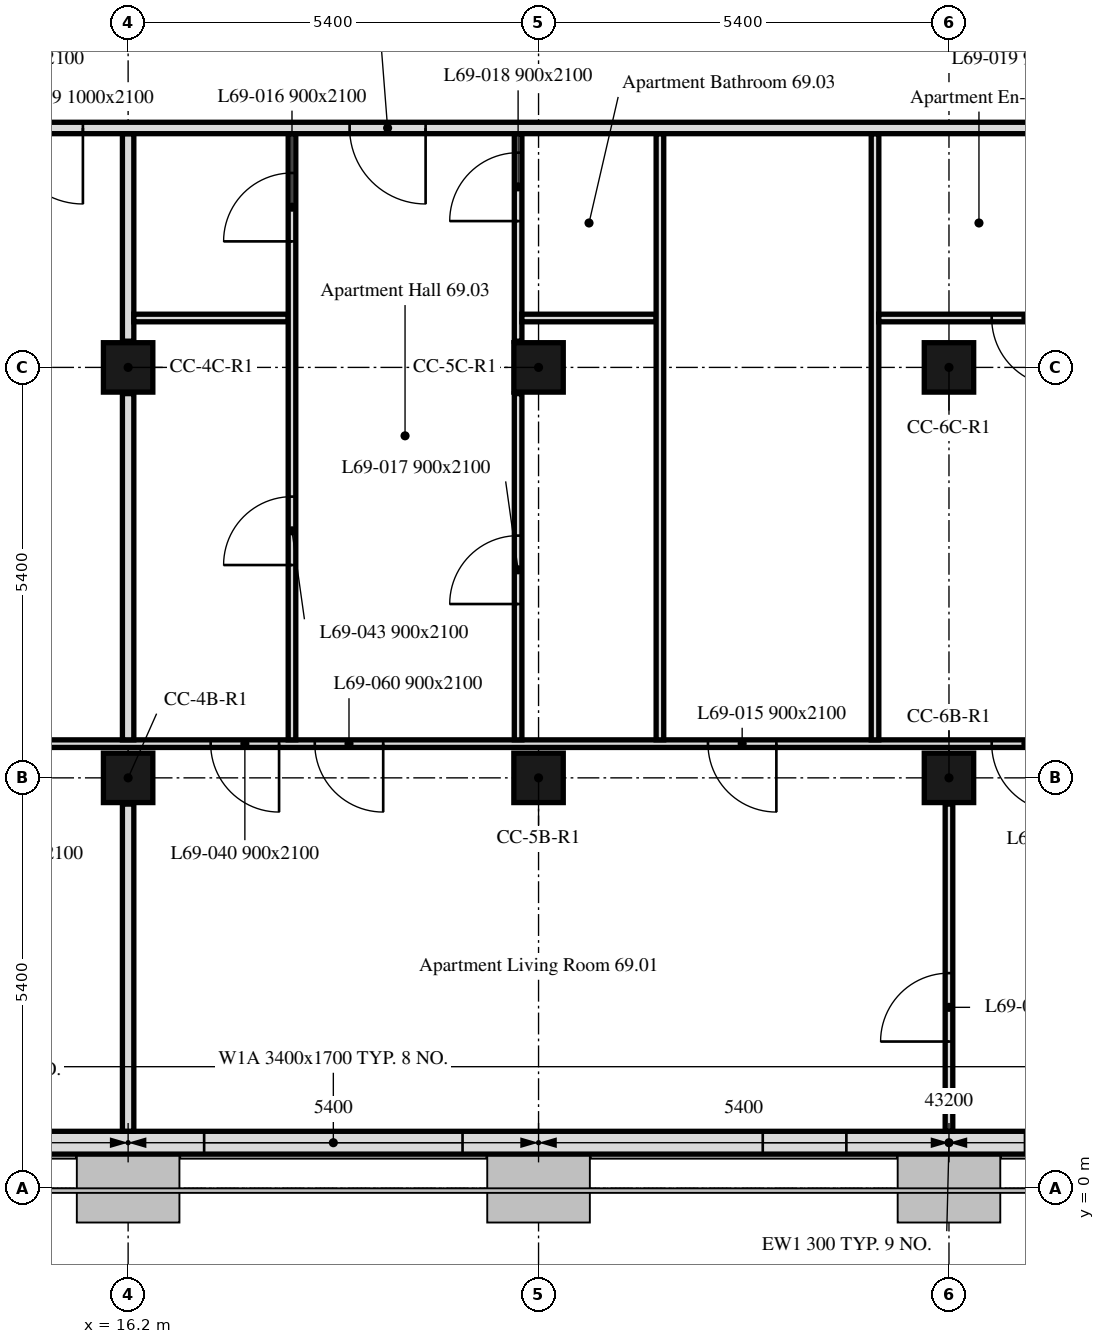
"""IFC4 building model, lengths in metres.
Left out: names, types, materials, properties, quantities, classifications, styles, units other than length and angle.
Written with IfcOpenShell. Run it as: python <this file> out.ifc"""

import sys

from ifc_helpers import new_model, si_unit, direction, frame, frame_2d, origin, origin_2d, place, context, subcontext, project, spatial, rectangle, extrude, element, fill, save


model = new_model("IFC4")
c1 = context("Model", 3, precision=1e-05, world=origin(), true_north=direction((0.0, 1.0)))
c2 = subcontext(c1, "Body", "Model", "MODEL_VIEW")
j1 = project(units=[si_unit("LENGTHUNIT", "METRE"), si_unit("PLANEANGLEUNIT", "RADIAN")], contexts=[c1])
p1 = place(None, origin())
s1 = spatial("IfcSite", under=j1, at=p1, CompositionType="ELEMENT")
p2 = place(p1, origin())
s2 = spatial("IfcBuilding", under=s1, at=p2, CompositionType="ELEMENT")
p3 = place(p2, frame((0.0, 0.0, 281.8)))
s3 = spatial("IfcBuildingStorey", under=s2, at=p3, CompositionType="ELEMENT", Elevation=281.8)
for number, where, z_axis, x_axis in (
    (1, (16.2, 5.4, 0.0), (0.0, 0.0, 1.0), (1.0, 0.0, 0.0)),
    (2, (21.6, 5.4, 0.0), (0.0, 0.0, 1.0), (1.0, 0.0, 0.0)),
    (3, (27.0, 5.4, 0.0), (0.0, 0.0, 1.0), (1.0, 0.0, 0.0)),
    (4, (16.2, 10.8, 0.0), (0.0, 0.0, 1.0), (1.0, 0.0, 0.0)),
    (5, (21.6, 10.8, 0.0), (0.0, 0.0, 1.0), (1.0, 0.0, 0.0)),
    (6, (27.0, 10.8, 0.0), (0.0, 0.0, 1.0), (1.0, 0.0, 0.0)),
):
    element("IfcColumn", number, at=place(p3, frame(where, z_axis=z_axis, x_axis=x_axis)), inside=s3, PredefinedType="COLUMN", context=c2, shape_type="SweptSolid", body=[
        extrude(rectangle(XDim=0.65, YDim=0.65, at=origin_2d()), origin(), (0.0, 0.0, 1.0), 3.0),
    ])
p4 = place(p3, frame((10.986, 0.6, 0.0), z_axis=(0.0, 0.0, 1.0), x_axis=(1.0, 0.0, 0.0)))
e7 = element("IfcWall", 7, at=p4, inside=s3, PredefinedType="SOLIDWALL", context=c2, shape_type="SweptSolid", body=[
    extrude(rectangle(XDim=32.027, YDim=0.3, at=frame_2d((16.014, 0.0))), origin(), (0.0, 0.0, 1.0), 3.0),
])
p5 = place(p4, frame((2.764, 0.0, 0.9)))
e8 = element("IfcOpeningElement", 8, at=p5, cuts=e7, PredefinedType="OPENING", context=c2, shape_type="SweptSolid", body=[
    extrude(rectangle(XDim=1.1, YDim=1.7, at=frame_2d((0.55, 0.85))), frame((0.0, 0.16, 0.0), z_axis=(0.0, -1.0, 0.0), x_axis=(1.0, 0.0, 0.0)), (0.0, 0.0, 1.0), 0.32),
])
p6 = place(p4, frame((6.214, 0.0, 0.9)))
e9 = element("IfcOpeningElement", 9, at=p6, cuts=e7, PredefinedType="OPENING", context=c2, shape_type="SweptSolid", body=[
    extrude(rectangle(XDim=3.4, YDim=1.7, at=frame_2d((1.7, 0.85))), frame((0.0, 0.16, 0.0), z_axis=(0.0, -1.0, 0.0), x_axis=(1.0, 0.0, 0.0)), (0.0, 0.0, 1.0), 0.32),
])
p7 = place(p4, frame((13.564, 0.0, 0.9)))
e10 = element("IfcOpeningElement", 10, at=p7, cuts=e7, PredefinedType="OPENING", context=c2, shape_type="SweptSolid", body=[
    extrude(rectangle(XDim=1.1, YDim=1.7, at=frame_2d((0.55, 0.85))), frame((0.0, 0.16, 0.0), z_axis=(0.0, -1.0, 0.0), x_axis=(1.0, 0.0, 0.0)), (0.0, 0.0, 1.0), 0.32),
])
p8 = place(p4, frame((17.014, 0.0, 0.9)))
e11 = element("IfcOpeningElement", 11, at=p8, cuts=e7, PredefinedType="OPENING", context=c2, shape_type="SweptSolid", body=[
    extrude(rectangle(XDim=3.4, YDim=1.7, at=frame_2d((1.7, 0.85))), frame((0.0, 0.16, 0.0), z_axis=(0.0, -1.0, 0.0), x_axis=(1.0, 0.0, 0.0)), (0.0, 0.0, 1.0), 0.32),
])
p9 = place(p4, frame((24.364, 0.0, 0.9)))
e12 = element("IfcOpeningElement", 12, at=p9, cuts=e7, PredefinedType="OPENING", context=c2, shape_type="SweptSolid", body=[
    extrude(rectangle(XDim=1.1, YDim=1.7, at=frame_2d((0.55, 0.85))), frame((0.0, 0.16, 0.0), z_axis=(0.0, -1.0, 0.0), x_axis=(1.0, 0.0, 0.0)), (0.0, 0.0, 1.0), 0.32),
])
p10 = place(p4, frame((27.814, 0.0, 0.9)))
e13 = element("IfcOpeningElement", 13, at=p10, cuts=e7, PredefinedType="OPENING", context=c2, shape_type="SweptSolid", body=[
    extrude(rectangle(XDim=3.4, YDim=1.7, at=frame_2d((1.7, 0.85))), frame((0.0, 0.16, 0.0), z_axis=(0.0, -1.0, 0.0), x_axis=(1.0, 0.0, 0.0)), (0.0, 0.0, 1.0), 0.32),
])
p11 = place(p3, frame((37.652, 5.85, 0.0), z_axis=(0.0, 0.0, 1.0), x_axis=(-1.0, 0.0, 0.0)))
e14 = element("IfcWall", 14, at=p11, inside=s3, PredefinedType="PARTITIONING", context=c2, shape_type="SweptSolid", body=[
    extrude(rectangle(XDim=31.501, YDim=0.1, at=frame_2d((15.75, 0.0))), origin(), (0.0, 0.0, 1.0), 2.4),
])
p12 = place(p11, frame((12.923, 0.0, 0.0)))
e15 = element("IfcOpeningElement", 15, at=p12, cuts=e14, PredefinedType="OPENING", context=c2, shape_type="SweptSolid", body=[
    extrude(rectangle(XDim=0.9, YDim=2.1, at=frame_2d((0.45, 1.05))), frame((0.0, 0.05, 0.0), z_axis=(0.0, -1.0, 0.0), x_axis=(1.0, 0.0, 0.0)), (0.0, 0.0, 1.0), 0.1),
])
p13 = place(p11, frame((29.422, 0.0, 0.0)))
e16 = element("IfcOpeningElement", 16, at=p13, cuts=e14, PredefinedType="OPENING", context=c2, shape_type="SweptSolid", body=[
    extrude(rectangle(XDim=0.9, YDim=2.1, at=frame_2d((0.45, 1.05))), frame((0.0, 0.05, 0.0), z_axis=(0.0, -1.0, 0.0), x_axis=(1.0, 0.0, 0.0)), (0.0, 0.0, 1.0), 0.1),
])
p14 = place(p11, frame((28.182, 0.0, 0.0)))
e17 = element("IfcOpeningElement", 17, at=p14, cuts=e14, PredefinedType="OPENING", context=c2, shape_type="SweptSolid", body=[
    extrude(rectangle(XDim=0.9, YDim=2.1, at=frame_2d((0.45, 1.05))), frame((0.0, 0.05, 0.0), z_axis=(0.0, -1.0, 0.0), x_axis=(1.0, 0.0, 0.0)), (0.0, 0.0, 1.0), 0.1),
])
p15 = place(p11, frame((23.942, 0.0, 0.0)))
e18 = element("IfcOpeningElement", 18, at=p15, cuts=e14, PredefinedType="OPENING", context=c2, shape_type="SweptSolid", body=[
    extrude(rectangle(XDim=0.9, YDim=2.1, at=frame_2d((0.45, 1.05))), frame((0.0, 0.05, 0.0), z_axis=(0.0, -1.0, 0.0), x_axis=(1.0, 0.0, 0.0)), (0.0, 0.0, 1.0), 0.1),
])
p16 = place(p11, frame((22.572, 0.0, 0.0)))
e19 = element("IfcOpeningElement", 19, at=p16, cuts=e14, PredefinedType="OPENING", context=c2, shape_type="SweptSolid", body=[
    extrude(rectangle(XDim=0.9, YDim=2.1, at=frame_2d((0.45, 1.05))), frame((0.0, 0.05, 0.0), z_axis=(0.0, -1.0, 0.0), x_axis=(1.0, 0.0, 0.0)), (0.0, 0.0, 1.0), 0.1),
])
p17 = place(p11, frame((19.466, 0.0, 0.0)))
e20 = element("IfcOpeningElement", 20, at=p17, cuts=e14, PredefinedType="OPENING", context=c2, shape_type="SweptSolid", body=[
    extrude(rectangle(XDim=0.9, YDim=2.1, at=frame_2d((0.45, 1.05))), frame((0.0, 0.05, 0.0), z_axis=(0.0, -1.0, 0.0), x_axis=(1.0, 0.0, 0.0)), (0.0, 0.0, 1.0), 0.1),
])
p18 = place(p11, frame((9.19, 0.0, 0.0)))
e21 = element("IfcOpeningElement", 21, at=p18, cuts=e14, PredefinedType="OPENING", context=c2, shape_type="SweptSolid", body=[
    extrude(rectangle(XDim=0.9, YDim=2.1, at=frame_2d((0.45, 1.05))), frame((0.0, 0.05, 0.0), z_axis=(0.0, -1.0, 0.0), x_axis=(1.0, 0.0, 0.0)), (0.0, 0.0, 1.0), 0.1),
])
p19 = place(p11, frame((7.512, 0.0, 0.0)))
e22 = element("IfcOpeningElement", 22, at=p19, cuts=e14, PredefinedType="OPENING", context=c2, shape_type="SweptSolid", body=[
    extrude(rectangle(XDim=0.9, YDim=2.1, at=frame_2d((0.45, 1.05))), frame((0.0, 0.05, 0.0), z_axis=(0.0, -1.0, 0.0), x_axis=(1.0, 0.0, 0.0)), (0.0, 0.0, 1.0), 0.1),
])
p20 = place(p11, frame((2.952, 0.0, 0.0)))
e23 = element("IfcOpeningElement", 23, at=p20, cuts=e14, PredefinedType="OPENING", context=c2, shape_type="SweptSolid", body=[
    extrude(rectangle(XDim=0.9, YDim=2.1, at=frame_2d((0.45, 1.05))), frame((0.0, 0.05, 0.0), z_axis=(0.0, -1.0, 0.0), x_axis=(1.0, 0.0, 0.0)), (0.0, 0.0, 1.0), 0.1),
])
p21 = place(p11, frame((18.096, 0.0, 0.0)))
e24 = element("IfcOpeningElement", 24, at=p21, cuts=e14, PredefinedType="OPENING", context=c2, shape_type="SweptSolid", body=[
    extrude(rectangle(XDim=0.9, YDim=2.1, at=frame_2d((0.45, 1.05))), frame((0.0, 0.05, 0.0), z_axis=(0.0, -1.0, 0.0), x_axis=(1.0, 0.0, 0.0)), (0.0, 0.0, 1.0), 0.1),
])
p22 = place(p3, frame((16.2, 0.751, 0.0), z_axis=(0.0, 0.0, 1.0), x_axis=(0.0, 1.0, 0.0)))
e25 = element("IfcWall", 25, at=p22, inside=s3, PredefinedType="PARTITIONING", context=c2, shape_type="SweptSolid", body=[
    extrude(rectangle(XDim=4.304, YDim=0.15, at=frame_2d((2.152, 0.0))), origin(), (0.0, 0.0, 1.0), 2.4),
])
p23 = place(p3, frame((16.2, 5.9, 0.0), z_axis=(0.0, 0.0, 1.0), x_axis=(0.0, 1.0, 0.0)))
e26 = element("IfcWall", 26, at=p23, inside=s3, PredefinedType="PARTITIONING", context=c2, shape_type="SweptSolid", body=[
    extrude(rectangle(XDim=4.555, YDim=0.15, at=frame_2d((2.278, 0.0))), origin(), (0.0, 0.0, 1.0), 2.4),
])
p24 = place(p3, frame((16.2, 11.145, 0.0), z_axis=(0.0, 0.0, 1.0), x_axis=(0.0, 1.0, 0.0)))
e27 = element("IfcWall", 27, at=p24, inside=s3, PredefinedType="PARTITIONING", context=c2, shape_type="SweptSolid", body=[
    extrude(rectangle(XDim=2.73, YDim=0.15, at=frame_2d((1.365, 0.0))), origin(), (0.0, 0.0, 1.0), 2.4),
])
p25 = place(p3, frame((27.0, 0.751, 0.0), z_axis=(0.0, 0.0, 1.0), x_axis=(0.0, 1.0, 0.0)))
e28 = element("IfcWall", 28, at=p25, inside=s3, PredefinedType="PARTITIONING", context=c2, shape_type="SweptSolid", body=[
    extrude(rectangle(XDim=4.304, YDim=0.1, at=frame_2d((2.152, 0.0))), origin(), (0.0, 0.0, 1.0), 2.4),
])
p26 = place(p25, frame((1.18, 0.0, 0.0)))
e29 = element("IfcOpeningElement", 29, at=p26, cuts=e28, PredefinedType="OPENING", context=c2, shape_type="SweptSolid", body=[
    extrude(rectangle(XDim=0.9, YDim=2.1, at=frame_2d((0.45, 1.05))), frame((0.0, 0.05, 0.0), z_axis=(0.0, -1.0, 0.0), x_axis=(1.0, 0.0, 0.0)), (0.0, 0.0, 1.0), 0.1),
])
p27 = place(p3, frame((18.306, 11.45, 0.0), z_axis=(0.0, 0.0, 1.0), x_axis=(-1.0, 0.0, 0.0)))
e30 = element("IfcWall", 30, at=p27, inside=s3, PredefinedType="PARTITIONING", context=c2, shape_type="SweptSolid", body=[
    extrude(rectangle(XDim=2.031, YDim=0.1, at=frame_2d((1.016, 0.0))), origin(), (0.0, 0.0, 1.0), 3.0),
])
p28 = place(p3, frame((18.356, 5.9, 0.0), z_axis=(0.0, 0.0, 1.0), x_axis=(0.0, 1.0, 0.0)))
e31 = element("IfcWall", 31, at=p28, inside=s3, PredefinedType="PARTITIONING", context=c2, shape_type="SweptSolid", body=[
    extrude(rectangle(XDim=7.975, YDim=0.1, at=frame_2d((3.988, 0.0))), origin(), (0.0, 0.0, 1.0), 3.0),
])
p29 = place(p28, frame((6.558, 0.0, 0.0)))
e32 = element("IfcOpeningElement", 32, at=p29, cuts=e31, PredefinedType="OPENING", context=c2, shape_type="SweptSolid", body=[
    extrude(rectangle(XDim=0.9, YDim=2.1, at=frame_2d((0.45, 1.05))), frame((0.0, 0.05, 0.0), z_axis=(0.0, -1.0, 0.0), x_axis=(1.0, 0.0, 0.0)), (0.0, 0.0, 1.0), 0.1),
])
p30 = place(p28, frame((2.3, 0.0, 0.0)))
e33 = element("IfcOpeningElement", 33, at=p30, cuts=e31, PredefinedType="OPENING", context=c2, shape_type="SweptSolid", body=[
    extrude(rectangle(XDim=0.9, YDim=2.1, at=frame_2d((0.45, 1.05))), frame((0.0, 0.05, 0.0), z_axis=(0.0, -1.0, 0.0), x_axis=(1.0, 0.0, 0.0)), (0.0, 0.0, 1.0), 0.1),
])
p31 = place(p3, frame((21.331, 5.9, 0.0), z_axis=(0.0, 0.0, 1.0), x_axis=(0.0, 1.0, 0.0)))
e34 = element("IfcWall", 34, at=p31, inside=s3, PredefinedType="PARTITIONING", context=c2, shape_type="SweptSolid", body=[
    extrude(rectangle(XDim=4.555, YDim=0.1, at=frame_2d((2.278, 0.0))), origin(), (0.0, 0.0, 1.0), 3.0),
])
p32 = place(p31, frame((1.787, 0.0, 0.0)))
e35 = element("IfcOpeningElement", 35, at=p32, cuts=e34, PredefinedType="OPENING", context=c2, shape_type="SweptSolid", body=[
    extrude(rectangle(XDim=0.9, YDim=2.1, at=frame_2d((0.45, 1.05))), frame((0.0, 0.05, 0.0), z_axis=(0.0, -1.0, 0.0), x_axis=(1.0, 0.0, 0.0)), (0.0, 0.0, 1.0), 0.1),
])
p33 = place(p3, frame((21.331, 11.145, 0.0), z_axis=(0.0, 0.0, 1.0), x_axis=(0.0, 1.0, 0.0)))
e36 = element("IfcWall", 36, at=p33, inside=s3, PredefinedType="PARTITIONING", context=c2, shape_type="SweptSolid", body=[
    extrude(rectangle(XDim=2.73, YDim=0.1, at=frame_2d((1.365, 0.0))), origin(), (0.0, 0.0, 1.0), 3.0),
])
p34 = place(p33, frame((1.58, 0.0, 0.0)))
e37 = element("IfcOpeningElement", 37, at=p34, cuts=e36, PredefinedType="OPENING", context=c2, shape_type="SweptSolid", body=[
    extrude(rectangle(XDim=0.9, YDim=2.1, at=frame_2d((0.45, 1.05))), frame((0.0, 0.05, 0.0), z_axis=(0.0, -1.0, 0.0), x_axis=(1.0, 0.0, 0.0)), (0.0, 0.0, 1.0), 0.1),
])
p35 = place(p3, frame((23.147, 11.45, 0.0), z_axis=(0.0, 0.0, 1.0), x_axis=(-1.0, 0.0, 0.0)))
e38 = element("IfcWall", 38, at=p35, inside=s3, PredefinedType="PARTITIONING", context=c2, shape_type="SweptSolid", body=[
    extrude(rectangle(XDim=1.766, YDim=0.1, at=frame_2d((0.883, 0.0))), origin(), (0.0, 0.0, 1.0), 2.4),
])
for number, where, z_axis, x_axis in (
    (39, (23.197, 5.9, 0.0), (0.0, 0.0, 1.0), (0.0, 1.0, 0.0)),
    (40, (26.027, 5.9, 0.0), (0.0, 0.0, 1.0), (0.0, 1.0, 0.0)),
):
    element("IfcWall", number, at=place(p3, frame(where, z_axis=z_axis, x_axis=x_axis)), inside=s3, PredefinedType="PARTITIONING", context=c2, shape_type="SweptSolid", body=[
        extrude(rectangle(XDim=7.975, YDim=0.1, at=frame_2d((3.988, 0.0))), origin(), (0.0, 0.0, 1.0), 3.0),
    ])
p36 = place(p3, frame((28.712, 11.45, 0.0), z_axis=(0.0, 0.0, 1.0), x_axis=(-1.0, 0.0, 0.0)))
e41 = element("IfcWall", 41, at=p36, inside=s3, PredefinedType="PARTITIONING", context=c2, shape_type="SweptSolid", body=[
    extrude(rectangle(XDim=2.635, YDim=0.1, at=frame_2d((1.317, 0.0))), origin(), (0.0, 0.0, 1.0), 2.4),
])
p37 = place(p36, frame((0.25, 0.0, 0.0)))
e42 = element("IfcOpeningElement", 42, at=p37, cuts=e41, PredefinedType="OPENING", context=c2, shape_type="SweptSolid", body=[
    extrude(rectangle(XDim=0.9, YDim=2.1, at=frame_2d((0.45, 1.05))), frame((0.0, 0.05, 0.0), z_axis=(0.0, -1.0, 0.0), x_axis=(1.0, 0.0, 0.0)), (0.0, 0.0, 1.0), 0.1),
])
p38 = place(p3, frame((47.849, 13.95, 0.0), z_axis=(0.0, 0.0, 1.0), x_axis=(-1.0, 0.0, 0.0)))
e43 = element("IfcWall", 43, at=p38, inside=s3, PredefinedType="PARTITIONING", context=c2, shape_type="SweptSolid", body=[
    extrude(rectangle(XDim=41.698, YDim=0.15, at=frame_2d((20.849, 0.0))), origin(), (0.0, 0.0, 1.0), 2.4),
])
p39 = place(p38, frame((37.749, 0.0, 0.0)))
e44 = element("IfcOpeningElement", 44, at=p39, cuts=e43, PredefinedType="OPENING", context=c2, shape_type="SweptSolid", body=[
    extrude(rectangle(XDim=1.0, YDim=2.1, at=frame_2d((0.5, 1.05))), frame((0.0, 0.075, 0.0), z_axis=(0.0, -1.0, 0.0), x_axis=(1.0, 0.0, 0.0)), (0.0, 0.0, 1.0), 0.15),
])
p40 = place(p38, frame((32.244, 0.0, 0.0)))
e45 = element("IfcOpeningElement", 45, at=p40, cuts=e43, PredefinedType="OPENING", context=c2, shape_type="SweptSolid", body=[
    extrude(rectangle(XDim=1.0, YDim=2.1, at=frame_2d((0.5, 1.05))), frame((0.0, 0.075, 0.0), z_axis=(0.0, -1.0, 0.0), x_axis=(1.0, 0.0, 0.0)), (0.0, 0.0, 1.0), 0.15),
])
p41 = place(p38, frame((27.735, 0.0, 0.0)))
e46 = element("IfcOpeningElement", 46, at=p41, cuts=e43, PredefinedType="OPENING", context=c2, shape_type="SweptSolid", body=[
    extrude(rectangle(XDim=1.0, YDim=2.1, at=frame_2d((0.5, 1.05))), frame((0.0, 0.075, 0.0), z_axis=(0.0, -1.0, 0.0), x_axis=(1.0, 0.0, 0.0)), (0.0, 0.0, 1.0), 0.15),
])
p42 = place(p38, frame((8.347, 0.0, 0.0)))
e47 = element("IfcOpeningElement", 47, at=p42, cuts=e43, PredefinedType="OPENING", context=c2, shape_type="SweptSolid", body=[
    extrude(rectangle(XDim=1.0, YDim=2.1, at=frame_2d((0.5, 1.05))), frame((0.0, 0.075, 0.0), z_axis=(0.0, -1.0, 0.0), x_axis=(1.0, 0.0, 0.0)), (0.0, 0.0, 1.0), 0.15),
])
p43 = place(p6, origin())
e48 = element("IfcWindow", 48, at=p43, inside=s3, PartitioningType="SINGLE_PANEL", PredefinedType="WINDOW", context=c2, shape_type="SweptSolid", body=[
    extrude(rectangle(XDim=3.4, YDim=1.7, at=frame_2d((1.7, 0.85))), frame((0.0, 0.03, 0.0), z_axis=(0.0, -1.0, 0.0), x_axis=(1.0, 0.0, 0.0)), (0.0, 0.0, 1.0), 0.06),
])
fill(e9, e48)
p44 = place(p7, origin())
e49 = element("IfcWindow", 49, at=p44, inside=s3, PartitioningType="SINGLE_PANEL", PredefinedType="WINDOW", context=c2, shape_type="SweptSolid", body=[
    extrude(rectangle(XDim=1.1, YDim=1.7, at=frame_2d((0.55, 0.85))), frame((0.0, 0.03, 0.0), z_axis=(0.0, -1.0, 0.0), x_axis=(1.0, 0.0, 0.0)), (0.0, 0.0, 1.0), 0.06),
])
fill(e10, e49)
p45 = place(p12, origin())
e50 = element("IfcDoor", 50, at=p45, inside=s3, OperationType="SINGLE_SWING_RIGHT", PredefinedType="DOOR", context=c2, shape_type="SweptSolid", body=[
    extrude(rectangle(XDim=0.9, YDim=2.1, at=frame_2d((0.45, 1.05))), frame((0.0, 0.025, 0.0), z_axis=(0.0, -1.0, 0.0), x_axis=(1.0, 0.0, 0.0)), (0.0, 0.0, 1.0), 0.05),
])
fill(e15, e50)
p46 = place(p29, origin())
e51 = element("IfcDoor", 51, at=p46, inside=s3, OperationType="SINGLE_SWING_RIGHT", PredefinedType="DOOR", context=c2, shape_type="SweptSolid", body=[
    extrude(rectangle(XDim=0.9, YDim=2.1, at=frame_2d((0.45, 1.05))), frame((0.0, 0.025, 0.0), z_axis=(0.0, -1.0, 0.0), x_axis=(1.0, 0.0, 0.0)), (0.0, 0.0, 1.0), 0.05),
])
fill(e32, e51)
p47 = place(p32, origin())
e52 = element("IfcDoor", 52, at=p47, inside=s3, OperationType="SINGLE_SWING_LEFT", PredefinedType="DOOR", context=c2, shape_type="SweptSolid", body=[
    extrude(rectangle(XDim=0.9, YDim=2.1, at=frame_2d((0.45, 1.05))), frame((0.0, 0.025, 0.0), z_axis=(0.0, -1.0, 0.0), x_axis=(1.0, 0.0, 0.0)), (0.0, 0.0, 1.0), 0.05),
])
fill(e35, e52)
p48 = place(p34, origin())
e53 = element("IfcDoor", 53, at=p48, inside=s3, OperationType="SINGLE_SWING_LEFT", PredefinedType="DOOR", context=c2, shape_type="SweptSolid", body=[
    extrude(rectangle(XDim=0.9, YDim=2.1, at=frame_2d((0.45, 1.05))), frame((0.0, 0.025, 0.0), z_axis=(0.0, -1.0, 0.0), x_axis=(1.0, 0.0, 0.0)), (0.0, 0.0, 1.0), 0.05),
])
fill(e37, e53)
p49 = place(p37, origin())
e54 = element("IfcDoor", 54, at=p49, inside=s3, OperationType="SINGLE_SWING_RIGHT", PredefinedType="DOOR", context=c2, shape_type="SweptSolid", body=[
    extrude(rectangle(XDim=0.9, YDim=2.1, at=frame_2d((0.45, 1.05))), frame((0.0, 0.025, 0.0), z_axis=(0.0, -1.0, 0.0), x_axis=(1.0, 0.0, 0.0)), (0.0, 0.0, 1.0), 0.05),
])
fill(e42, e54)
p50 = place(p17, origin())
e55 = element("IfcDoor", 55, at=p50, inside=s3, OperationType="SINGLE_SWING_LEFT", PredefinedType="DOOR", context=c2, shape_type="SweptSolid", body=[
    extrude(rectangle(XDim=0.9, YDim=2.1, at=frame_2d((0.45, 1.05))), frame((0.0, 0.025, 0.0), z_axis=(0.0, -1.0, 0.0), x_axis=(1.0, 0.0, 0.0)), (0.0, 0.0, 1.0), 0.05),
])
fill(e20, e55)
p51 = place(p18, origin())
e56 = element("IfcDoor", 56, at=p51, inside=s3, OperationType="SINGLE_SWING_LEFT", PredefinedType="DOOR", context=c2, shape_type="SweptSolid", body=[
    extrude(rectangle(XDim=0.9, YDim=2.1, at=frame_2d((0.45, 1.05))), frame((0.0, 0.025, 0.0), z_axis=(0.0, -1.0, 0.0), x_axis=(1.0, 0.0, 0.0)), (0.0, 0.0, 1.0), 0.05),
])
fill(e21, e56)
p52 = place(p30, origin())
e57 = element("IfcDoor", 57, at=p52, inside=s3, OperationType="SINGLE_SWING_LEFT", PredefinedType="DOOR", context=c2, shape_type="SweptSolid", body=[
    extrude(rectangle(XDim=0.9, YDim=2.1, at=frame_2d((0.45, 1.05))), frame((0.0, 0.025, 0.0), z_axis=(0.0, -1.0, 0.0), x_axis=(1.0, 0.0, 0.0)), (0.0, 0.0, 1.0), 0.05),
])
fill(e33, e57)
p53 = place(p26, origin())
e58 = element("IfcDoor", 58, at=p53, inside=s3, OperationType="SINGLE_SWING_RIGHT", PredefinedType="DOOR", context=c2, shape_type="SweptSolid", body=[
    extrude(rectangle(XDim=0.9, YDim=2.1, at=frame_2d((0.45, 1.05))), frame((0.0, 0.025, 0.0), z_axis=(0.0, -1.0, 0.0), x_axis=(1.0, 0.0, 0.0)), (0.0, 0.0, 1.0), 0.05),
])
fill(e29, e58)
p54 = place(p40, origin())
e59 = element("IfcDoor", 59, at=p54, inside=s3, OperationType="SINGLE_SWING_LEFT", PredefinedType="DOOR", context=c2, shape_type="SweptSolid", body=[
    extrude(rectangle(XDim=1.0, YDim=2.1, at=frame_2d((0.5, 1.05))), frame((0.0, 0.025, 0.0), z_axis=(0.0, -1.0, 0.0), x_axis=(1.0, 0.0, 0.0)), (0.0, 0.0, 1.0), 0.05),
])
fill(e45, e59)
p55 = place(p21, origin())
e60 = element("IfcDoor", 60, at=p55, inside=s3, OperationType="SINGLE_SWING_RIGHT", PredefinedType="DOOR", context=c2, shape_type="SweptSolid", body=[
    extrude(rectangle(XDim=0.9, YDim=2.1, at=frame_2d((0.45, 1.05))), frame((0.0, 0.025, 0.0), z_axis=(0.0, -1.0, 0.0), x_axis=(1.0, 0.0, 0.0)), (0.0, 0.0, 1.0), 0.05),
])
fill(e24, e60)
p56 = place(p41, origin())
e61 = element("IfcDoor", 61, at=p56, inside=s3, OperationType="SINGLE_SWING_RIGHT", PredefinedType="DOOR", context=c2, shape_type="SweptSolid", body=[
    extrude(rectangle(XDim=1.0, YDim=2.1, at=frame_2d((0.5, 1.05))), frame((0.0, 0.025, 0.0), z_axis=(0.0, -1.0, 0.0), x_axis=(1.0, 0.0, 0.0)), (0.0, 0.0, 1.0), 0.05),
])
fill(e46, e61)
save(model, sys.argv[1])
